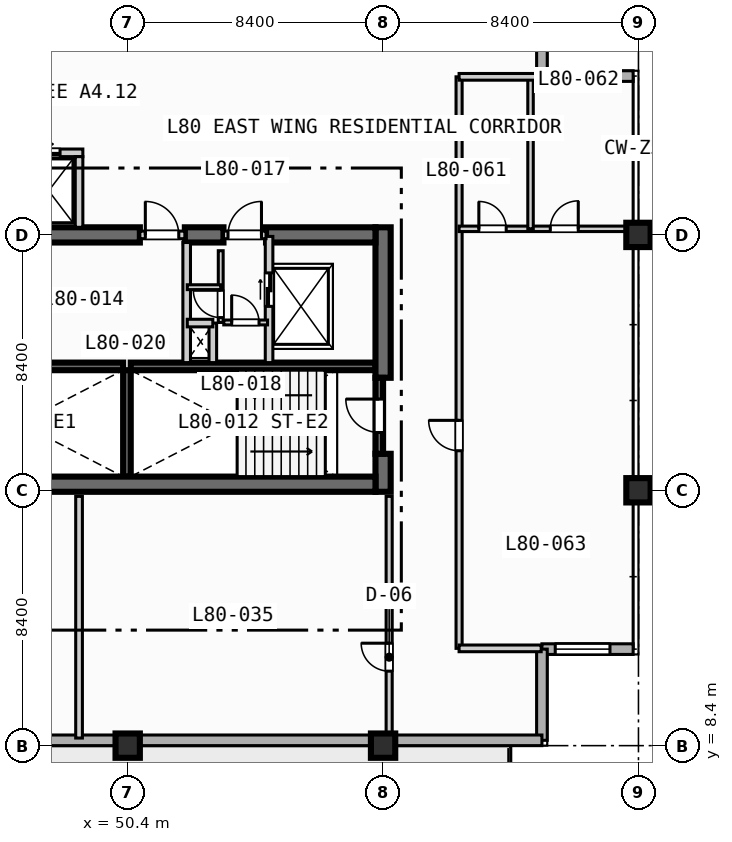
"""IFC4 building model, lengths in metres.
Left out: names, types, materials, properties, quantities, classifications, styles, units other than length and angle.
Written with IfcOpenShell. Run it as: python <this file> out.ifc"""

import sys

from ifc_helpers import new_model, si_unit, direction, frame, frame_2d, origin, origin_2d, place, context, subcontext, project, spatial, rectangle, extrude, element, fill, save


model = new_model("IFC4")
c1 = context("Model", 3, precision=1e-05, world=origin(), true_north=direction((0.0, 1.0)))
c2 = subcontext(c1, "Body", "Model", "MODEL_VIEW")
j1 = project(units=[si_unit("LENGTHUNIT", "METRE"), si_unit("PLANEANGLEUNIT", "RADIAN")], contexts=[c1])
p1 = place(None, origin())
s1 = spatial("IfcSite", under=j1, at=p1, CompositionType="ELEMENT")
p2 = place(p1, origin())
s2 = spatial("IfcBuilding", under=s1, at=p2, CompositionType="ELEMENT")
p3 = place(p2, frame((0.0, 0.0, 324.2)))
s3 = spatial("IfcBuildingStorey", under=s2, at=p3, CompositionType="ELEMENT", Elevation=324.2)
for number, where, z_axis, x_axis in (
    (1, (42.2, 20.875, 0.0), (0.0, 0.0, 1.0), (1.0, 0.0, 0.0)),
    (2, (50.5, 20.875, 0.0), (0.0, 0.0, 1.0), (1.0, 0.0, 0.0)),
):
    element("IfcWall", number, at=place(p3, frame(where, z_axis=z_axis, x_axis=x_axis)), inside=s3, PredefinedType="SOLIDWALL", context=c2, shape_type="SweptSolid", body=[
        extrude(rectangle(XDim=8.05, YDim=0.25, at=frame_2d((4.025, 0.0))), origin(), (0.0, 0.0, 1.0), 3.67),
    ])
p4 = place(p3, frame((50.375, 17.25, 0.0), z_axis=(0.0, 0.0, 1.0), x_axis=(0.0, 1.0, 0.0)))
e3 = element("IfcWall", 3, at=p4, inside=s3, PredefinedType="SOLIDWALL", context=c2, shape_type="SweptSolid", body=[
    extrude(rectangle(XDim=3.5, YDim=0.25, at=frame_2d((1.75, 0.0))), origin(), (0.0, 0.0, 1.0), 3.67),
])
p5 = place(p3, frame((58.8, 16.75, 0.0), z_axis=(0.0, 0.0, 1.0), x_axis=(0.0, 1.0, 0.0)))
e4 = element("IfcWall", 4, at=p5, inside=s3, PredefinedType="SHEAR", context=c2, shape_type="SweptSolid", body=[
    extrude(rectangle(XDim=1.25, YDim=0.5, at=frame_2d((0.625, 0.0))), origin(), (0.0, 0.0, 1.0), 3.67),
])
p6 = place(p3, frame((58.8, 20.5, 0.0), z_axis=(0.0, 0.0, 1.0), x_axis=(0.0, 1.0, 0.0)))
e5 = element("IfcWall", 5, at=p6, inside=s3, PredefinedType="SHEAR", context=c2, shape_type="SweptSolid", body=[
    extrude(rectangle(XDim=4.95, YDim=0.5, at=frame_2d((2.475, 0.0))), origin(), (0.0, 0.0, 1.0), 3.67),
])
p7 = place(p3, frame((42.2, 17.0, 0.0), z_axis=(0.0, 0.0, 1.0), x_axis=(1.0, 0.0, 0.0)))
e6 = element("IfcWall", 6, at=p7, inside=s3, PredefinedType="SHEAR", context=c2, shape_type="SweptSolid", body=[
    extrude(rectangle(XDim=16.35, YDim=0.5, at=frame_2d((8.175, 0.0))), origin(), (0.0, 0.0, 1.0), 3.67),
])
p8 = place(p3, frame((42.2, 25.2, 0.0), z_axis=(0.0, 0.0, 1.0), x_axis=(1.0, 0.0, 0.0)))
e7 = element("IfcWall", 7, at=p8, inside=s3, PredefinedType="SHEAR", context=c2, shape_type="SweptSolid", body=[
    extrude(rectangle(XDim=8.6, YDim=0.5, at=frame_2d((4.3, 0.0))), origin(), (0.0, 0.0, 1.0), 3.67),
])
p9 = place(p3, frame((52.28, 25.2, 0.0), z_axis=(0.0, 0.0, 1.0), x_axis=(1.0, 0.0, 0.0)))
e8 = element("IfcWall", 8, at=p9, inside=s3, PredefinedType="SHEAR", context=c2, shape_type="SweptSolid", body=[
    extrude(rectangle(XDim=1.27, YDim=0.5, at=frame_2d((0.635, 0.0))), origin(), (0.0, 0.0, 1.0), 3.67),
])
p10 = place(p3, frame((54.95, 25.2, 0.0), z_axis=(0.0, 0.0, 1.0), x_axis=(1.0, 0.0, 0.0)))
e9 = element("IfcWall", 9, at=p10, inside=s3, PredefinedType="SHEAR", context=c2, shape_type="SweptSolid", body=[
    extrude(rectangle(XDim=3.6, YDim=0.5, at=frame_2d((1.8, 0.0))), origin(), (0.0, 0.0, 1.0), 3.67),
])
for number, where, z_axis, x_axis in (
    (10, (50.4, 8.4, 0.0), (0.0, 0.0, 1.0), (1.0, 0.0, 0.0)),
    (11, (58.8, 8.4, 0.0), (0.0, 0.0, 1.0), (1.0, 0.0, 0.0)),
    (12, (67.2, 16.8, 0.0), (0.0, 0.0, 1.0), (1.0, 0.0, 0.0)),
    (13, (67.2, 25.2, 0.0), (0.0, 0.0, 1.0), (1.0, 0.0, 0.0)),
):
    element("IfcColumn", number, at=place(p3, frame(where, z_axis=z_axis, x_axis=x_axis)), inside=s3, PredefinedType="COLUMN", context=c2, shape_type="SweptSolid", body=[
        extrude(rectangle(XDim=0.8, YDim=0.8, at=origin_2d()), origin(), (0.0, 0.0, 1.0), 3.9),
    ])
for number, where, z_axis, x_axis in (
    (14, (64.025, 33.425, 0.0), (0.0, 0.0, 1.0), (0.0, -1.0, 0.0)),
    (15, (64.025, 30.425, 0.0), (0.0, 0.0, 1.0), (1.0, 0.0, 0.0)),
):
    element("IfcWall", number, at=place(p3, frame(where, z_axis=z_axis, x_axis=x_axis)), inside=s3, PredefinedType="STANDARD", context=c2, shape_type="SweptSolid", body=[
        extrude(rectangle(XDim=3.0, YDim=0.35, at=frame_2d((1.5, 0.0))), origin(), (0.0, 0.0, 1.0), 3.67),
    ])
p11 = place(p3, frame((67.025, 11.575, 0.0), z_axis=(0.0, 0.0, 1.0), x_axis=(-1.0, 0.0, 0.0)))
e16 = element("IfcWall", 16, at=p11, inside=s3, PredefinedType="STANDARD", context=c2, shape_type="SweptSolid", body=[
    extrude(rectangle(XDim=3.0, YDim=0.35, at=frame_2d((1.5, 0.0))), origin(), (0.0, 0.0, 1.0), 3.67),
])
p12 = place(p11, frame((0.762, 0.0, 0.85)))
e17 = element("IfcOpeningElement", 17, at=p12, cuts=e16, PredefinedType="OPENING", context=c2, shape_type="SweptSolid", body=[
    extrude(rectangle(XDim=1.8, YDim=1.8, at=frame_2d((0.9, 0.9))), frame((0.0, 0.185, 0.0), z_axis=(0.0, -1.0, 0.0), x_axis=(1.0, 0.0, 0.0)), (0.0, 0.0, 1.0), 0.37),
])
p13 = place(p3, frame((64.025, 11.575, 0.0), z_axis=(0.0, 0.0, 1.0), x_axis=(0.0, -1.0, 0.0)))
e18 = element("IfcWall", 18, at=p13, inside=s3, PredefinedType="STANDARD", context=c2, shape_type="SweptSolid", body=[
    extrude(rectangle(XDim=3.0, YDim=0.35, at=frame_2d((1.5, 0.0))), origin(), (0.0, 0.0, 1.0), 3.67),
])
p14 = place(p3, frame((64.025, 8.575, 0.0), z_axis=(0.0, 0.0, 1.0), x_axis=(-1.0, 0.0, 0.0)))
e19 = element("IfcWall", 19, at=p14, inside=s3, PredefinedType="STANDARD", context=c2, shape_type="SweptSolid", body=[
    extrude(rectangle(XDim=52.45, YDim=0.35, at=frame_2d((26.225, 0.0))), origin(), (0.0, 0.0, 1.0), 3.67),
])
p15 = place(p14, frame((32.925, 0.0, 0.0)))
e20 = element("IfcOpeningElement", 20, at=p15, cuts=e19, PredefinedType="OPENING", context=c2, shape_type="SweptSolid", body=[
    extrude(rectangle(XDim=1.4, YDim=2.2, at=frame_2d((0.7, 1.1))), frame((0.0, 0.185, 0.0), z_axis=(0.0, -1.0, 0.0), x_axis=(1.0, 0.0, 0.0)), (0.0, 0.0, 1.0), 0.37),
])
p16 = place(p14, frame((41.825, 0.0, 0.85)))
e21 = element("IfcOpeningElement", 21, at=p16, cuts=e19, PredefinedType="OPENING", context=c2, shape_type="SweptSolid", body=[
    extrude(rectangle(XDim=2.4, YDim=1.95, at=frame_2d((1.2, 0.975))), frame((0.0, 0.185, 0.0), z_axis=(0.0, -1.0, 0.0), x_axis=(1.0, 0.0, 0.0)), (0.0, 0.0, 1.0), 0.37),
])
p17 = place(p14, frame((25.025, 0.0, 0.85)))
e22 = element("IfcOpeningElement", 22, at=p17, cuts=e19, PredefinedType="OPENING", context=c2, shape_type="SweptSolid", body=[
    extrude(rectangle(XDim=2.4, YDim=1.95, at=frame_2d((1.2, 0.975))), frame((0.0, 0.185, 0.0), z_axis=(0.0, -1.0, 0.0), x_axis=(1.0, 0.0, 0.0)), (0.0, 0.0, 1.0), 0.37),
])
p18 = place(p14, frame((16.925, 0.0, 0.85)))
e23 = element("IfcOpeningElement", 23, at=p18, cuts=e19, PredefinedType="OPENING", context=c2, shape_type="SweptSolid", body=[
    extrude(rectangle(XDim=1.8, YDim=1.8, at=frame_2d((0.9, 0.9))), frame((0.0, 0.185, 0.0), z_axis=(0.0, -1.0, 0.0), x_axis=(1.0, 0.0, 0.0)), (0.0, 0.0, 1.0), 0.37),
])
p19 = place(p14, frame((49.75, 0.0, 0.85)))
e24 = element("IfcOpeningElement", 24, at=p19, cuts=e19, PredefinedType="OPENING", context=c2, shape_type="SweptSolid", body=[
    extrude(rectangle(XDim=1.8, YDim=1.8, at=frame_2d((0.9, 0.9))), frame((0.0, 0.185, 0.0), z_axis=(0.0, -1.0, 0.0), x_axis=(1.0, 0.0, 0.0)), (0.0, 0.0, 1.0), 0.37),
])
p20 = place(p14, frame((47.89, 0.0, 0.85)))
e25 = element("IfcOpeningElement", 25, at=p20, cuts=e19, PredefinedType="OPENING", context=c2, shape_type="SweptSolid", body=[
    extrude(rectangle(XDim=0.72, YDim=1.8, at=frame_2d((0.36, 0.9))), frame((0.0, 0.185, 0.0), z_axis=(0.0, -1.0, 0.0), x_axis=(1.0, 0.0, 0.0)), (0.0, 0.0, 1.0), 0.37),
])
p21 = place(p14, frame((35.75, 0.0, 0.85)))
e26 = element("IfcOpeningElement", 26, at=p21, cuts=e19, PredefinedType="OPENING", context=c2, shape_type="SweptSolid", body=[
    extrude(rectangle(XDim=1.8, YDim=1.8, at=frame_2d((0.9, 0.9))), frame((0.0, 0.185, 0.0), z_axis=(0.0, -1.0, 0.0), x_axis=(1.0, 0.0, 0.0)), (0.0, 0.0, 1.0), 0.37),
])
p22 = place(p3, frame((58.675, 18.0, 0.0), z_axis=(0.0, 0.0, 1.0), x_axis=(0.0, 1.0, 0.0)))
e27 = element("IfcWall", 27, at=p22, inside=s3, PredefinedType="SOLIDWALL", context=c2, shape_type="SweptSolid", body=[
    extrude(rectangle(XDim=2.5, YDim=0.25, at=frame_2d((1.25, 0.0))), origin(), (0.0, 0.0, 1.0), 3.67),
])
p23 = place(p22, frame((0.7, 0.0, 0.0)))
e28 = element("IfcOpeningElement", 28, at=p23, cuts=e27, PredefinedType="OPENING", context=c2, shape_type="SweptSolid", body=[
    extrude(rectangle(XDim=1.1, YDim=2.15, at=frame_2d((0.55, 1.075))), frame((0.0, 0.135, 0.0), z_axis=(0.0, -1.0, 0.0), x_axis=(1.0, 0.0, 0.0)), (0.0, 0.0, 1.0), 0.27),
])
p24 = place(p3, frame((50.8, 25.2, 0.0), z_axis=(0.0, 0.0, 1.0), x_axis=(1.0, 0.0, 0.0)))
e29 = element("IfcWall", 29, at=p24, inside=s3, PredefinedType="SOLIDWALL", context=c2, shape_type="SweptSolid", body=[
    extrude(rectangle(XDim=1.48, YDim=0.25, at=frame_2d((0.74, 0.0))), origin(), (0.0, 0.0, 1.0), 3.67),
])
p25 = place(p24, frame((0.18, 0.0, 0.0)))
e30 = element("IfcOpeningElement", 30, at=p25, cuts=e29, PredefinedType="OPENING", context=c2, shape_type="SweptSolid", body=[
    extrude(rectangle(XDim=1.1, YDim=2.15, at=frame_2d((0.55, 1.075))), frame((0.0, 0.135, 0.0), z_axis=(0.0, -1.0, 0.0), x_axis=(1.0, 0.0, 0.0)), (0.0, 0.0, 1.0), 0.27),
])
p26 = place(p3, frame((52.34, 21.0, 0.0), z_axis=(0.0, 0.0, 1.0), x_axis=(0.0, 1.0, 0.0)))
e31 = element("IfcWall", 31, at=p26, inside=s3, PredefinedType="SOLIDWALL", context=c2, shape_type="SweptSolid", body=[
    extrude(rectangle(XDim=3.95, YDim=0.25, at=frame_2d((1.975, 0.0))), origin(), (0.0, 0.0, 1.0), 3.67),
])
p27 = place(p3, frame((55.05, 21.0, 0.0), z_axis=(0.0, 0.0, 1.0), x_axis=(0.0, 1.0, 0.0)))
e32 = element("IfcWall", 32, at=p27, inside=s3, PredefinedType="SOLIDWALL", context=c2, shape_type="SweptSolid", body=[
    extrude(rectangle(XDim=4.15, YDim=0.25, at=frame_2d((2.075, 0.0))), origin(), (0.0, 0.0, 1.0), 3.67),
])
p28 = place(p27, frame((1.85, 0.0, 0.0)))
e33 = element("IfcOpeningElement", 33, at=p28, cuts=e32, PredefinedType="OPENING", context=c2, shape_type="SweptSolid", body=[
    extrude(rectangle(XDim=1.1, YDim=2.15, at=frame_2d((0.55, 1.075))), frame((0.0, 0.135, 0.0), z_axis=(0.0, -1.0, 0.0), x_axis=(1.0, 0.0, 0.0)), (0.0, 0.0, 1.0), 0.27),
])
p29 = place(p3, frame((53.55, 25.2, 0.0), z_axis=(0.0, 0.0, 1.0), x_axis=(1.0, 0.0, 0.0)))
e34 = element("IfcWall", 34, at=p29, inside=s3, PredefinedType="SOLIDWALL", context=c2, shape_type="SweptSolid", body=[
    extrude(rectangle(XDim=1.4, YDim=0.25, at=frame_2d((0.7, 0.0))), origin(), (0.0, 0.0, 1.0), 3.67),
])
p30 = place(p29, frame((0.15, 0.0, 0.0)))
e35 = element("IfcOpeningElement", 35, at=p30, cuts=e34, PredefinedType="OPENING", context=c2, shape_type="SweptSolid", body=[
    extrude(rectangle(XDim=1.1, YDim=2.15, at=frame_2d((0.55, 1.075))), frame((0.0, 0.135, 0.0), z_axis=(0.0, -1.0, 0.0), x_axis=(1.0, 0.0, 0.0)), (0.0, 0.0, 1.0), 0.27),
])
p31 = place(p3, frame((53.2, 21.0, 0.0), z_axis=(0.0, 0.0, 1.0), x_axis=(0.0, 1.0, 0.0)))
e36 = element("IfcWall", 36, at=p31, inside=s3, PredefinedType="SOLIDWALL", context=c2, shape_type="SweptSolid", body=[
    extrude(rectangle(XDim=1.3, YDim=0.25, at=frame_2d((0.65, 0.0))), origin(), (0.0, 0.0, 1.0), 3.67),
])
p32 = place(p3, frame((52.36, 22.3, 0.0), z_axis=(0.0, 0.0, 1.0), x_axis=(1.0, 0.0, 0.0)))
e37 = element("IfcWall", 37, at=p32, inside=s3, PredefinedType="SOLIDWALL", context=c2, shape_type="SweptSolid", body=[
    extrude(rectangle(XDim=0.84, YDim=0.25, at=frame_2d((0.42, 0.0))), origin(), (0.0, 0.0, 1.0), 3.67),
])
p33 = place(p3, frame((53.56, 22.32, 0.0), z_axis=(0.0, 0.0, 1.0), x_axis=(1.0, 0.0, 0.0)))
e38 = element("IfcWall", 38, at=p33, inside=s3, PredefinedType="PARTITIONING", context=c2, shape_type="SweptSolid", body=[
    extrude(rectangle(XDim=1.44, YDim=0.16, at=frame_2d((0.72, 0.0))), origin(), (0.0, 0.0, 1.0), 3.67),
])
p34 = place(p33, frame((0.26, 0.0, 0.0)))
e39 = element("IfcOpeningElement", 39, at=p34, cuts=e38, PredefinedType="OPENING", context=c2, shape_type="SweptSolid", body=[
    extrude(rectangle(XDim=0.9, YDim=2.1, at=frame_2d((0.45, 1.05))), frame((0.0, 0.09, 0.0), z_axis=(0.0, -1.0, 0.0), x_axis=(1.0, 0.0, 0.0)), (0.0, 0.0, 1.0), 0.18),
])
p35 = place(p3, frame((53.46, 22.32, 0.0), z_axis=(0.0, 0.0, 1.0), x_axis=(0.0, 1.0, 0.0)))
e40 = element("IfcWall", 40, at=p35, inside=s3, PredefinedType="PARTITIONING", context=c2, shape_type="SweptSolid", body=[
    extrude(rectangle(XDim=2.36, YDim=0.16, at=frame_2d((1.18, 0.0))), origin(), (0.0, 0.0, 1.0), 3.67),
])
p36 = place(p35, frame((0.16, 0.0, 0.0)))
e41 = element("IfcOpeningElement", 41, at=p36, cuts=e40, PredefinedType="OPENING", context=c2, shape_type="SweptSolid", body=[
    extrude(rectangle(XDim=0.9, YDim=2.1, at=frame_2d((0.45, 1.05))), frame((0.0, 0.09, 0.0), z_axis=(0.0, -1.0, 0.0), x_axis=(1.0, 0.0, 0.0)), (0.0, 0.0, 1.0), 0.18),
])
p37 = place(p3, frame((52.36, 23.48, 0.0), z_axis=(0.0, 0.0, 1.0), x_axis=(1.0, 0.0, 0.0)))
e42 = element("IfcWall", 42, at=p37, inside=s3, PredefinedType="PARTITIONING", context=c2, shape_type="SweptSolid", body=[
    extrude(rectangle(XDim=1.1, YDim=0.16, at=frame_2d((0.55, 0.0))), origin(), (0.0, 0.0, 1.0), 3.67),
])
p38 = place(p3, frame((46.675, 27.9, 0.0), z_axis=(0.0, 0.0, 1.0), x_axis=(1.0, 0.0, 0.0)))
e43 = element("IfcWall", 43, at=p38, inside=s3, PredefinedType="SOLIDWALL", context=c2, shape_type="SweptSolid", body=[
    extrude(rectangle(XDim=2.25, YDim=0.25, at=frame_2d((1.125, 0.0))), origin(), (0.0, 0.0, 1.0), 3.67),
])
p39 = place(p38, frame((0.4, 0.0, 0.0)))
e44 = element("IfcOpeningElement", 44, at=p39, cuts=e43, PredefinedType="OPENING", context=c2, shape_type="SweptSolid", body=[
    extrude(rectangle(XDim=1.1, YDim=2.15, at=frame_2d((0.55, 1.075))), frame((0.0, 0.135, 0.0), z_axis=(0.0, -1.0, 0.0), x_axis=(1.0, 0.0, 0.0)), (0.0, 0.0, 1.0), 0.27),
])
p40 = place(p3, frame((48.8, 25.45, 0.0), z_axis=(0.0, 0.0, 1.0), x_axis=(0.0, 1.0, 0.0)))
e45 = element("IfcWall", 45, at=p40, inside=s3, PredefinedType="SOLIDWALL", context=c2, shape_type="SweptSolid", body=[
    extrude(rectangle(XDim=2.325, YDim=0.25, at=frame_2d((1.163, 0.0))), origin(), (0.0, 0.0, 1.0), 3.67),
])
p41 = place(p3, frame((59.0, 8.65, 0.0), z_axis=(0.0, 0.0, 1.0), x_axis=(0.0, 1.0, 0.0)))
e46 = element("IfcWall", 46, at=p41, inside=s3, PredefinedType="PARTITIONING", context=c2, shape_type="SweptSolid", body=[
    extrude(rectangle(XDim=7.95, YDim=0.2, at=frame_2d((3.975, 0.0))), origin(), (0.0, 0.0, 1.0), 3.307),
])
p42 = place(p41, frame((2.2, 0.0, 0.0)))
e47 = element("IfcOpeningElement", 47, at=p42, cuts=e46, PredefinedType="OPENING", context=c2, shape_type="SweptSolid", body=[
    extrude(rectangle(XDim=0.92, YDim=2.1, at=frame_2d((0.46, 1.05))), frame((0.0, 0.11, 0.0), z_axis=(0.0, -1.0, 0.0), x_axis=(1.0, 0.0, 0.0)), (0.0, 0.0, 1.0), 0.22),
])
p43 = place(p3, frame((48.8, 8.65, 0.0), z_axis=(0.0, 0.0, 1.0), x_axis=(0.0, 1.0, 0.0)))
e48 = element("IfcWall", 48, at=p43, inside=s3, PredefinedType="PARTITIONING", context=c2, shape_type="SweptSolid", body=[
    extrude(rectangle(XDim=7.95, YDim=0.22, at=frame_2d((3.975, 0.0))), origin(), (0.0, 0.0, 1.0), 3.67),
])
p44 = place(p3, frame((61.3, 11.6, 0.0), z_axis=(0.0, 0.0, 1.0), x_axis=(0.0, 1.0, 0.0)))
e49 = element("IfcWall", 49, at=p44, inside=s3, PredefinedType="PARTITIONING", context=c2, shape_type="SweptSolid", body=[
    extrude(rectangle(XDim=18.8, YDim=0.2, at=frame_2d((9.4, 0.0))), origin(), (0.0, 0.0, 1.0), 3.67),
])
p45 = place(p44, frame((6.5, 0.0, 0.0)))
e50 = element("IfcOpeningElement", 50, at=p45, cuts=e49, PredefinedType="OPENING", context=c2, shape_type="SweptSolid", body=[
    extrude(rectangle(XDim=1.0, YDim=2.15, at=frame_2d((0.5, 1.075))), frame((0.0, 0.11, 0.0), z_axis=(0.0, -1.0, 0.0), x_axis=(1.0, 0.0, 0.0)), (0.0, 0.0, 1.0), 0.22),
])
p46 = place(p3, frame((61.3, 25.4, 0.0), z_axis=(0.0, 0.0, 1.0), x_axis=(1.0, 0.0, 0.0)))
e51 = element("IfcWall", 51, at=p46, inside=s3, PredefinedType="PLUMBINGWALL", context=c2, shape_type="SweptSolid", body=[
    extrude(rectangle(XDim=5.5, YDim=0.18, at=frame_2d((2.75, 0.0))), origin(), (0.0, 0.0, 1.0), 3.07),
])
p47 = place(p46, frame((0.65, 0.0, 0.0)))
e52 = element("IfcOpeningElement", 52, at=p47, cuts=e51, PredefinedType="OPENING", context=c2, shape_type="SweptSolid", body=[
    extrude(rectangle(XDim=0.9, YDim=2.1, at=frame_2d((0.45, 1.05))), frame((0.0, 0.1, 0.0), z_axis=(0.0, -1.0, 0.0), x_axis=(1.0, 0.0, 0.0)), (0.0, 0.0, 1.0), 0.2),
])
p48 = place(p46, frame((3.0, 0.0, 0.0)))
e53 = element("IfcOpeningElement", 53, at=p48, cuts=e51, PredefinedType="OPENING", context=c2, shape_type="SweptSolid", body=[
    extrude(rectangle(XDim=0.92, YDim=2.1, at=frame_2d((0.46, 1.05))), frame((0.0, 0.1, 0.0), z_axis=(0.0, -1.0, 0.0), x_axis=(1.0, 0.0, 0.0)), (0.0, 0.0, 1.0), 0.2),
])
p49 = place(p3, frame((63.65, 25.4, 0.0), z_axis=(0.0, 0.0, 1.0), x_axis=(0.0, 1.0, 0.0)))
e54 = element("IfcWall", 54, at=p49, inside=s3, PredefinedType="PLUMBINGWALL", context=c2, shape_type="SweptSolid", body=[
    extrude(rectangle(XDim=5.0, YDim=0.18, at=frame_2d((2.5, 0.0))), origin(), (0.0, 0.0, 1.0), 3.67),
])
for number, where, z_axis, x_axis in (
    (55, (61.3, 11.6, 0.0), (0.0, 0.0, 1.0), (1.0, 0.0, 0.0)),
    (56, (61.3, 30.4, 0.0), (0.0, 0.0, 1.0), (1.0, 0.0, 0.0)),
):
    element("IfcWall", number, at=place(p3, frame(where, z_axis=z_axis, x_axis=x_axis)), inside=s3, PredefinedType="PARTITIONING", context=c2, shape_type="SweptSolid", body=[
        extrude(rectangle(XDim=2.7, YDim=0.22, at=frame_2d((1.35, 0.0))), origin(), (0.0, 0.0, 1.0), 3.67),
    ])
p50 = place(p12, origin())
e57 = element("IfcWindow", 57, at=p50, inside=s3, PartitioningType="SINGLE_PANEL", PredefinedType="WINDOW", context=c2, shape_type="SweptSolid", body=[
    extrude(rectangle(XDim=1.8, YDim=1.8, at=frame_2d((0.9, 0.9))), frame((0.0, 0.03, 0.0), z_axis=(0.0, -1.0, 0.0), x_axis=(1.0, 0.0, 0.0)), (0.0, 0.0, 1.0), 0.06),
])
fill(e17, e57)
p51 = place(p23, origin())
e58 = element("IfcDoor", 58, at=p51, inside=s3, OperationType="SINGLE_SWING_RIGHT", PredefinedType="DOOR", context=c2, shape_type="SweptSolid", body=[
    extrude(rectangle(XDim=1.1, YDim=2.15, at=frame_2d((0.55, 1.075))), frame((0.0, 0.025, 0.0), z_axis=(0.0, -1.0, 0.0), x_axis=(1.0, 0.0, 0.0)), (0.0, 0.0, 1.0), 0.05),
])
fill(e28, e58)
p52 = place(p25, origin())
e59 = element("IfcDoor", 59, at=p52, inside=s3, OperationType="SINGLE_SWING_LEFT", PredefinedType="DOOR", context=c2, shape_type="SweptSolid", body=[
    extrude(rectangle(XDim=1.1, YDim=2.15, at=frame_2d((0.55, 1.075))), frame((0.0, 0.025, 0.0), z_axis=(0.0, -1.0, 0.0), x_axis=(1.0, 0.0, 0.0)), (0.0, 0.0, 1.0), 0.05),
])
fill(e30, e59)
p53 = place(p28, origin())
e60 = element("IfcDoor", 60, at=p53, inside=s3, OperationType="SLIDING_TO_LEFT", PredefinedType="DOOR", context=c2, shape_type="SweptSolid", body=[
    extrude(rectangle(XDim=1.1, YDim=2.15, at=frame_2d((0.55, 1.075))), frame((0.0, 0.025, 0.0), z_axis=(0.0, -1.0, 0.0), x_axis=(1.0, 0.0, 0.0)), (0.0, 0.0, 1.0), 0.05),
])
fill(e33, e60)
p54 = place(p30, origin())
e61 = element("IfcDoor", 61, at=p54, inside=s3, OperationType="SINGLE_SWING_RIGHT", PredefinedType="DOOR", context=c2, shape_type="SweptSolid", body=[
    extrude(rectangle(XDim=1.1, YDim=2.15, at=frame_2d((0.55, 1.075))), frame((0.0, 0.025, 0.0), z_axis=(0.0, -1.0, 0.0), x_axis=(1.0, 0.0, 0.0)), (0.0, 0.0, 1.0), 0.05),
])
fill(e35, e61)
p55 = place(p34, origin())
e62 = element("IfcDoor", 62, at=p55, inside=s3, OperationType="SINGLE_SWING_LEFT", PredefinedType="DOOR", context=c2, shape_type="SweptSolid", body=[
    extrude(rectangle(XDim=0.9, YDim=2.1, at=frame_2d((0.45, 1.05))), frame((0.0, 0.025, 0.0), z_axis=(0.0, -1.0, 0.0), x_axis=(1.0, 0.0, 0.0)), (0.0, 0.0, 1.0), 0.05),
])
fill(e39, e62)
p56 = place(p36, origin())
e63 = element("IfcDoor", 63, at=p56, inside=s3, OperationType="SINGLE_SWING_RIGHT", PredefinedType="DOOR", context=c2, shape_type="SweptSolid", body=[
    extrude(rectangle(XDim=0.9, YDim=2.1, at=frame_2d((0.45, 1.05))), frame((0.0, 0.025, 0.0), z_axis=(0.0, -1.0, 0.0), x_axis=(1.0, 0.0, 0.0)), (0.0, 0.0, 1.0), 0.05),
])
fill(e41, e63)
p57 = place(p39, origin())
e64 = element("IfcDoor", 64, at=p57, inside=s3, OperationType="SLIDING_TO_LEFT", PredefinedType="DOOR", context=c2, shape_type="SweptSolid", body=[
    extrude(rectangle(XDim=1.1, YDim=2.15, at=frame_2d((0.55, 1.075))), frame((0.0, 0.025, 0.0), z_axis=(0.0, -1.0, 0.0), x_axis=(1.0, 0.0, 0.0)), (0.0, 0.0, 1.0), 0.05),
])
fill(e44, e64)
p58 = place(p42, origin())
e65 = element("IfcDoor", 65, at=p58, inside=s3, OperationType="SINGLE_SWING_RIGHT", PredefinedType="DOOR", context=c2, shape_type="SweptSolid", body=[
    extrude(rectangle(XDim=0.92, YDim=2.1, at=frame_2d((0.46, 1.05))), frame((0.0, 0.025, 0.0), z_axis=(0.0, -1.0, 0.0), x_axis=(1.0, 0.0, 0.0)), (0.0, 0.0, 1.0), 0.05),
])
fill(e47, e65)
p59 = place(p45, origin())
e66 = element("IfcDoor", 66, at=p59, inside=s3, OperationType="SINGLE_SWING_RIGHT", PredefinedType="DOOR", context=c2, shape_type="SweptSolid", body=[
    extrude(rectangle(XDim=1.0, YDim=2.15, at=frame_2d((0.5, 1.075))), frame((0.0, 0.025, 0.0), z_axis=(0.0, -1.0, 0.0), x_axis=(1.0, 0.0, 0.0)), (0.0, 0.0, 1.0), 0.05),
])
fill(e50, e66)
p60 = place(p47, origin())
e67 = element("IfcDoor", 67, at=p60, inside=s3, OperationType="SINGLE_SWING_LEFT", PredefinedType="DOOR", context=c2, shape_type="SweptSolid", body=[
    extrude(rectangle(XDim=0.9, YDim=2.1, at=frame_2d((0.45, 1.05))), frame((0.0, 0.025, 0.0), z_axis=(0.0, -1.0, 0.0), x_axis=(1.0, 0.0, 0.0)), (0.0, 0.0, 1.0), 0.05),
])
fill(e52, e67)
p61 = place(p48, origin())
e68 = element("IfcDoor", 68, at=p61, inside=s3, OperationType="SINGLE_SWING_RIGHT", PredefinedType="DOOR", context=c2, shape_type="SweptSolid", body=[
    extrude(rectangle(XDim=0.92, YDim=2.1, at=frame_2d((0.46, 1.05))), frame((0.0, 0.025, 0.0), z_axis=(0.0, -1.0, 0.0), x_axis=(1.0, 0.0, 0.0)), (0.0, 0.0, 1.0), 0.05),
])
fill(e53, e68)
save(model, sys.argv[1])
